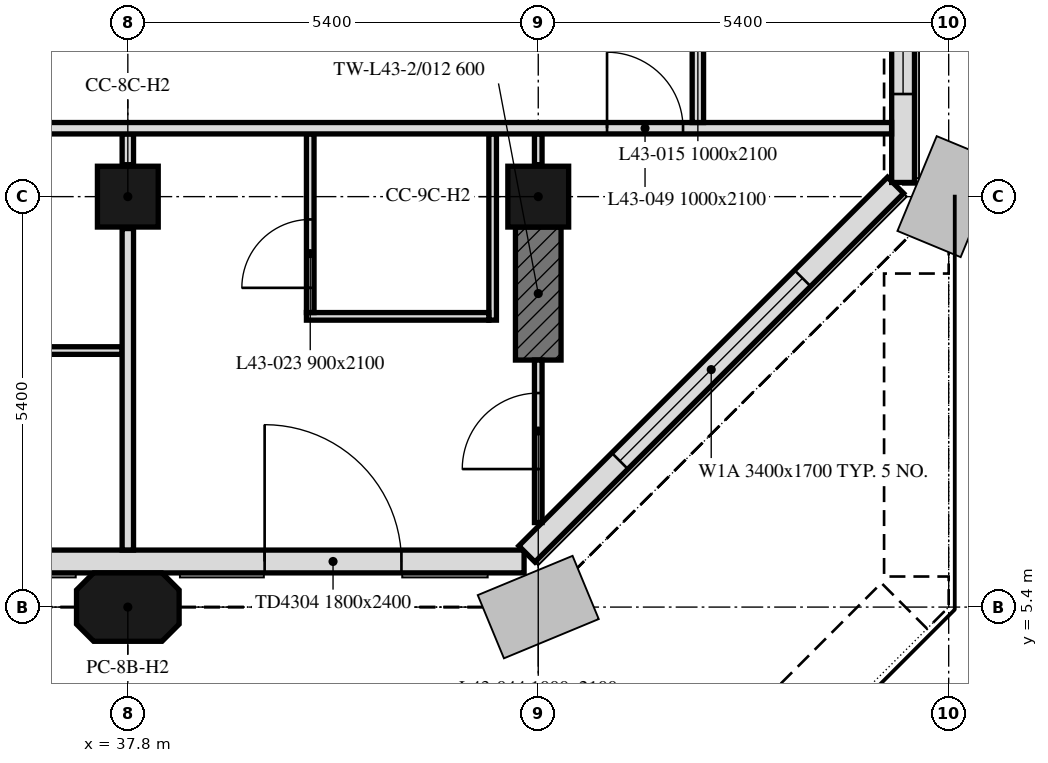
"""IFC4 building model, lengths in metres.
Left out: names, types, materials, properties, quantities, classifications, styles, units other than length and angle.
Written with IfcOpenShell. Run it as: python <this file> out.ifc"""

import sys

from ifc_helpers import new_model, si_unit, direction, frame, frame_2d, origin, origin_2d, place, context, subcontext, project, spatial, polyline, rectangle, outline, extrude, element, fill, save


model = new_model("IFC4")
c1 = context("Model", 3, precision=1e-05, world=origin(), true_north=direction((0.0, 1.0)))
c2 = subcontext(c1, "Body", "Model", "MODEL_VIEW")
j1 = project(units=[si_unit("LENGTHUNIT", "METRE"), si_unit("PLANEANGLEUNIT", "RADIAN")], contexts=[c1])
p1 = place(None, origin())
s1 = spatial("IfcSite", under=j1, at=p1, CompositionType="ELEMENT")
p2 = place(p1, origin())
s2 = spatial("IfcBuilding", under=s1, at=p2, CompositionType="ELEMENT")
p3 = place(p2, frame((0.0, 0.0, 180.7)))
s3 = spatial("IfcBuildingStorey", under=s2, at=p3, CompositionType="ELEMENT", Elevation=180.7)
p4 = place(p3, frame((37.8, 5.4, 0.0), z_axis=(0.0, 0.0, 1.0), x_axis=(1.0, 0.0, 0.0)))
e1 = element("IfcColumn", 1, at=p4, inside=s3, PredefinedType="COLUMN", context=c2, shape_type="SweptSolid", body=[
    extrude(outline(polyline([(-0.45, -0.45), (0.45, -0.45), (0.675, -0.225), (0.675, 0.225), (0.45, 0.45), (-0.45, 0.45), (-0.675, 0.225), (-0.675, -0.225), (-0.45, -0.45)])), origin(), (0.0, 0.0, 1.0), 3.0),
])
for number, where, z_axis, x_axis in (
    (2, (37.8, 10.8, 0.0), (0.0, 0.0, 1.0), (1.0, 0.0, 0.0)),
    (3, (43.2, 10.8, 0.0), (0.0, 0.0, 1.0), (1.0, 0.0, 0.0)),
):
    element("IfcColumn", number, at=place(p3, frame(where, z_axis=z_axis, x_axis=x_axis)), inside=s3, PredefinedType="COLUMN", context=c2, shape_type="SweptSolid", body=[
        extrude(rectangle(XDim=0.8, YDim=0.8, at=origin_2d()), origin(), (0.0, 0.0, 1.0), 3.0),
    ])
p5 = place(p3, frame((43.2, 8.65, 0.0), z_axis=(0.0, 0.0, 1.0), x_axis=(0.0, 1.0, 0.0)))
e4 = element("IfcWall", 4, at=p5, inside=s3, PredefinedType="SHEAR", context=c2, shape_type="SweptSolid", body=[
    extrude(rectangle(XDim=1.75, YDim=0.6, at=frame_2d((0.875, 0.0))), origin(), (0.0, 0.0, 1.0), 3.0),
])
p6 = place(p3, frame((10.986, 6.0, 0.0), z_axis=(0.0, 0.0, 1.0), x_axis=(1.0, 0.0, 0.0)))
e5 = element("IfcWall", 5, at=p6, inside=s3, PredefinedType="SOLIDWALL", context=c2, shape_type="SweptSolid", body=[
    extrude(rectangle(XDim=32.027, YDim=0.3, at=frame_2d((16.014, 0.0))), origin(), (0.0, 0.0, 1.0), 3.0),
])
p7 = place(p6, frame((1.614, 0.0, 0.0)))
e6 = element("IfcOpeningElement", 6, at=p7, cuts=e5, PredefinedType="OPENING", context=c2, shape_type="SweptSolid", body=[
    extrude(rectangle(XDim=1.8, YDim=2.4, at=frame_2d((0.9, 1.2))), frame((0.0, 0.16, 0.0), z_axis=(0.0, -1.0, 0.0), x_axis=(1.0, 0.0, 0.0)), (0.0, 0.0, 1.0), 0.32),
])
p8 = place(p6, frame((12.414, 0.0, 0.0)))
e7 = element("IfcOpeningElement", 7, at=p8, cuts=e5, PredefinedType="OPENING", context=c2, shape_type="SweptSolid", body=[
    extrude(rectangle(XDim=1.8, YDim=2.4, at=frame_2d((0.9, 1.2))), frame((0.0, 0.16, 0.0), z_axis=(0.0, -1.0, 0.0), x_axis=(1.0, 0.0, 0.0)), (0.0, 0.0, 1.0), 0.32),
])
p9 = place(p6, frame((23.214, 0.0, 0.0)))
e8 = element("IfcOpeningElement", 8, at=p9, cuts=e5, PredefinedType="OPENING", context=c2, shape_type="SweptSolid", body=[
    extrude(rectangle(XDim=1.8, YDim=2.4, at=frame_2d((0.9, 1.2))), frame((0.0, 0.16, 0.0), z_axis=(0.0, -1.0, 0.0), x_axis=(1.0, 0.0, 0.0)), (0.0, 0.0, 1.0), 0.32),
])
p10 = place(p6, frame((28.614, 0.0, 0.0)))
e9 = element("IfcOpeningElement", 9, at=p10, cuts=e5, PredefinedType="OPENING", context=c2, shape_type="SweptSolid", body=[
    extrude(rectangle(XDim=1.8, YDim=2.4, at=frame_2d((0.9, 1.2))), frame((0.0, 0.16, 0.0), z_axis=(0.0, -1.0, 0.0), x_axis=(1.0, 0.0, 0.0)), (0.0, 0.0, 1.0), 0.32),
])
p11 = place(p6, frame((7.464, 0.0, 0.9)))
e10 = element("IfcOpeningElement", 10, at=p11, cuts=e5, PredefinedType="OPENING", context=c2, shape_type="SweptSolid", body=[
    extrude(rectangle(XDim=1.1, YDim=1.7, at=frame_2d((0.55, 0.85))), frame((0.0, 0.16, 0.0), z_axis=(0.0, -1.0, 0.0), x_axis=(1.0, 0.0, 0.0)), (0.0, 0.0, 1.0), 0.32),
])
p12 = place(p6, frame((18.264, 0.0, 0.9)))
e11 = element("IfcOpeningElement", 11, at=p12, cuts=e5, PredefinedType="OPENING", context=c2, shape_type="SweptSolid", body=[
    extrude(rectangle(XDim=1.1, YDim=1.7, at=frame_2d((0.55, 0.85))), frame((0.0, 0.16, 0.0), z_axis=(0.0, -1.0, 0.0), x_axis=(1.0, 0.0, 0.0)), (0.0, 0.0, 1.0), 0.32),
])
p13 = place(p3, frame((43.051, 6.099, 0.0), z_axis=(0.0, 0.0, 1.0), x_axis=(0.707106781187, 0.707106781187, 0.0)))
e12 = element("IfcWall", 12, at=p13, inside=s3, PredefinedType="SOLIDWALL", context=c2, shape_type="SweptSolid", body=[
    extrude(rectangle(XDim=6.86, YDim=0.3, at=frame_2d((3.43, 0.0))), origin(), (0.0, 0.0, 1.0), 3.0),
])
p14 = place(p13, frame((1.73, 0.0, 0.9)))
e13 = element("IfcOpeningElement", 13, at=p14, cuts=e12, PredefinedType="OPENING", context=c2, shape_type="SweptSolid", body=[
    extrude(rectangle(XDim=3.4, YDim=1.7, at=frame_2d((1.7, 0.85))), frame((0.0, 0.16, 0.0), z_axis=(0.0, -1.0, 0.0), x_axis=(1.0, 0.0, 0.0)), (0.0, 0.0, 1.0), 0.32),
])
p15 = place(p3, frame((48.0, 10.986, 0.0), z_axis=(0.0, 0.0, 1.0), x_axis=(0.0, 1.0, 0.0)))
e14 = element("IfcWall", 14, at=p15, inside=s3, PredefinedType="SOLIDWALL", context=c2, shape_type="SweptSolid", body=[
    extrude(rectangle(XDim=32.027, YDim=0.3, at=frame_2d((16.014, 0.0))), origin(), (0.0, 0.0, 1.0), 3.0),
])
p16 = place(p15, frame((1.164, 0.0, 0.9)))
e15 = element("IfcOpeningElement", 15, at=p16, cuts=e14, PredefinedType="OPENING", context=c2, shape_type="SweptSolid", body=[
    extrude(rectangle(XDim=1.1, YDim=1.7, at=frame_2d((0.55, 0.85))), frame((0.0, 0.16, 0.0), z_axis=(0.0, -1.0, 0.0), x_axis=(1.0, 0.0, 0.0)), (0.0, 0.0, 1.0), 0.32),
])
p17 = place(p15, frame((2.764, 0.0, 0.9)))
e16 = element("IfcOpeningElement", 16, at=p17, cuts=e14, PredefinedType="OPENING", context=c2, shape_type="SweptSolid", body=[
    extrude(rectangle(XDim=1.1, YDim=1.7, at=frame_2d((0.55, 0.85))), frame((0.0, 0.16, 0.0), z_axis=(0.0, -1.0, 0.0), x_axis=(1.0, 0.0, 0.0)), (0.0, 0.0, 1.0), 0.32),
])
p18 = place(p15, frame((7.664, 0.0, 0.9)))
e17 = element("IfcOpeningElement", 17, at=p18, cuts=e14, PredefinedType="OPENING", context=c2, shape_type="SweptSolid", body=[
    extrude(rectangle(XDim=0.5, YDim=1.7, at=frame_2d((0.25, 0.85))), frame((0.0, 0.16, 0.0), z_axis=(0.0, -1.0, 0.0), x_axis=(1.0, 0.0, 0.0)), (0.0, 0.0, 1.0), 0.32),
])
p19 = place(p15, frame((13.064, 0.0, 0.9)))
e18 = element("IfcOpeningElement", 18, at=p19, cuts=e14, PredefinedType="OPENING", context=c2, shape_type="SweptSolid", body=[
    extrude(rectangle(XDim=0.5, YDim=1.7, at=frame_2d((0.25, 0.85))), frame((0.0, 0.16, 0.0), z_axis=(0.0, -1.0, 0.0), x_axis=(1.0, 0.0, 0.0)), (0.0, 0.0, 1.0), 0.32),
])
p20 = place(p15, frame((18.464, 0.0, 0.9)))
e19 = element("IfcOpeningElement", 19, at=p20, cuts=e14, PredefinedType="OPENING", context=c2, shape_type="SweptSolid", body=[
    extrude(rectangle(XDim=0.5, YDim=1.7, at=frame_2d((0.25, 0.85))), frame((0.0, 0.16, 0.0), z_axis=(0.0, -1.0, 0.0), x_axis=(1.0, 0.0, 0.0)), (0.0, 0.0, 1.0), 0.32),
])
p21 = place(p15, frame((23.864, 0.0, 0.9)))
e20 = element("IfcOpeningElement", 20, at=p21, cuts=e14, PredefinedType="OPENING", context=c2, shape_type="SweptSolid", body=[
    extrude(rectangle(XDim=0.5, YDim=1.7, at=frame_2d((0.25, 0.85))), frame((0.0, 0.16, 0.0), z_axis=(0.0, -1.0, 0.0), x_axis=(1.0, 0.0, 0.0)), (0.0, 0.0, 1.0), 0.32),
])
p22 = place(p15, frame((28.164, 0.0, 0.9)))
e21 = element("IfcOpeningElement", 21, at=p22, cuts=e14, PredefinedType="OPENING", context=c2, shape_type="SweptSolid", body=[
    extrude(rectangle(XDim=1.1, YDim=1.7, at=frame_2d((0.55, 0.85))), frame((0.0, 0.16, 0.0), z_axis=(0.0, -1.0, 0.0), x_axis=(1.0, 0.0, 0.0)), (0.0, 0.0, 1.0), 0.32),
])
p23 = place(p15, frame((29.764, 0.0, 0.9)))
e22 = element("IfcOpeningElement", 22, at=p23, cuts=e14, PredefinedType="OPENING", context=c2, shape_type="SweptSolid", body=[
    extrude(rectangle(XDim=1.1, YDim=1.7, at=frame_2d((0.55, 0.85))), frame((0.0, 0.16, 0.0), z_axis=(0.0, -1.0, 0.0), x_axis=(1.0, 0.0, 0.0)), (0.0, 0.0, 1.0), 0.32),
])
p24 = place(p3, frame((37.725, 8.775, 0.0), z_axis=(0.0, 0.0, 1.0), x_axis=(-1.0, 0.0, 0.0)))
e23 = element("IfcWall", 23, at=p24, inside=s3, PredefinedType="PARTITIONING", context=c2, shape_type="SweptSolid", body=[
    extrude(rectangle(XDim=2.375, YDim=0.1, at=frame_2d((1.188, 0.0))), origin(), (0.0, 0.0, 1.0), 3.0),
])
p25 = place(p3, frame((37.8, 6.151, 0.0), z_axis=(0.0, 0.0, 1.0), x_axis=(0.0, 1.0, 0.0)))
e24 = element("IfcWall", 24, at=p25, inside=s3, PredefinedType="PARTITIONING", context=c2, shape_type="SweptSolid", body=[
    extrude(rectangle(XDim=4.229, YDim=0.15, at=frame_2d((2.115, 0.0))), origin(), (0.0, 0.0, 1.0), 3.0),
])
p26 = place(p3, frame((37.8, 11.22, 0.0), z_axis=(0.0, 0.0, 1.0), x_axis=(0.0, 1.0, 0.0)))
e25 = element("IfcWall", 25, at=p26, inside=s3, PredefinedType="PARTITIONING", context=c2, shape_type="SweptSolid", body=[
    extrude(rectangle(XDim=0.405, YDim=0.15, at=frame_2d((0.203, 0.0))), origin(), (0.0, 0.0, 1.0), 3.0),
])
p27 = place(p3, frame((43.2, 6.512, 0.0), z_axis=(0.0, 0.0, 1.0), x_axis=(0.0, 1.0, 0.0)))
e26 = element("IfcWall", 26, at=p27, inside=s3, PredefinedType="PARTITIONING", context=c2, shape_type="SweptSolid", body=[
    extrude(rectangle(XDim=2.138, YDim=0.1, at=frame_2d((1.069, 0.0))), origin(), (0.0, 0.0, 1.0), 3.0),
])
p28 = place(p27, frame((0.704, 0.0, 0.0)))
e27 = element("IfcOpeningElement", 27, at=p28, cuts=e26, PredefinedType="OPENING", context=c2, shape_type="SweptSolid", body=[
    extrude(rectangle(XDim=1.0, YDim=2.1, at=frame_2d((0.5, 1.05))), frame((0.0, 0.05, 0.0), z_axis=(0.0, -1.0, 0.0), x_axis=(1.0, 0.0, 0.0)), (0.0, 0.0, 1.0), 0.1),
])
p29 = place(p3, frame((43.2, 11.22, 0.0), z_axis=(0.0, 0.0, 1.0), x_axis=(0.0, 1.0, 0.0)))
e28 = element("IfcWall", 28, at=p29, inside=s3, PredefinedType="PARTITIONING", context=c2, shape_type="SweptSolid", body=[
    extrude(rectangle(XDim=0.405, YDim=0.1, at=frame_2d((0.203, 0.0))), origin(), (0.0, 0.0, 1.0), 3.0),
])
p30 = place(p3, frame((42.6, 11.625, 0.0), z_axis=(0.0, 0.0, 1.0), x_axis=(0.0, -1.0, 0.0)))
e29 = element("IfcWall", 29, at=p30, inside=s3, PredefinedType="PARTITIONING", context=c2, shape_type="SweptSolid", body=[
    extrude(rectangle(XDim=2.45, YDim=0.1, at=frame_2d((1.225, 0.0))), origin(), (0.0, 0.0, 1.0), 3.0),
])
p31 = place(p3, frame((42.55, 9.225, 0.0), z_axis=(0.0, 0.0, 1.0), x_axis=(-1.0, 0.0, 0.0)))
e30 = element("IfcWall", 30, at=p31, inside=s3, PredefinedType="PARTITIONING", context=c2, shape_type="SweptSolid", body=[
    extrude(rectangle(XDim=2.4, YDim=0.1, at=frame_2d((1.2, 0.0))), origin(), (0.0, 0.0, 1.0), 3.0),
])
p32 = place(p3, frame((40.2, 9.275, 0.0), z_axis=(0.0, 0.0, 1.0), x_axis=(0.0, 1.0, 0.0)))
e31 = element("IfcWall", 31, at=p32, inside=s3, PredefinedType="PARTITIONING", context=c2, shape_type="SweptSolid", body=[
    extrude(rectangle(XDim=2.35, YDim=0.1, at=frame_2d((1.175, 0.0))), origin(), (0.0, 0.0, 1.0), 3.0),
])
p33 = place(p32, frame((0.325, 0.0, 0.0)))
e32 = element("IfcOpeningElement", 32, at=p33, cuts=e31, PredefinedType="OPENING", context=c2, shape_type="SweptSolid", body=[
    extrude(rectangle(XDim=0.9, YDim=2.1, at=frame_2d((0.45, 1.05))), frame((0.0, 0.05, 0.0), z_axis=(0.0, -1.0, 0.0), x_axis=(1.0, 0.0, 0.0)), (0.0, 0.0, 1.0), 0.1),
])
p34 = place(p3, frame((6.151, 11.7, 0.0), z_axis=(0.0, 0.0, 1.0), x_axis=(1.0, 0.0, 0.0)))
e33 = element("IfcWall", 33, at=p34, inside=s3, PredefinedType="PARTITIONING", context=c2, shape_type="SweptSolid", body=[
    extrude(rectangle(XDim=41.698, YDim=0.15, at=frame_2d((20.849, 0.0))), origin(), (0.0, 0.0, 1.0), 3.0),
])
p35 = place(p34, frame((1.449, 0.0, 0.0)))
e34 = element("IfcOpeningElement", 34, at=p35, cuts=e33, PredefinedType="OPENING", context=c2, shape_type="SweptSolid", body=[
    extrude(rectangle(XDim=1.0, YDim=2.1, at=frame_2d((0.5, 1.05))), frame((0.0, 0.075, 0.0), z_axis=(0.0, -1.0, 0.0), x_axis=(1.0, 0.0, 0.0)), (0.0, 0.0, 1.0), 0.15),
])
p36 = place(p34, frame((37.954, 0.0, 0.0)))
e35 = element("IfcOpeningElement", 35, at=p36, cuts=e33, PredefinedType="OPENING", context=c2, shape_type="SweptSolid", body=[
    extrude(rectangle(XDim=1.0, YDim=2.1, at=frame_2d((0.5, 1.05))), frame((0.0, 0.075, 0.0), z_axis=(0.0, -1.0, 0.0), x_axis=(1.0, 0.0, 0.0)), (0.0, 0.0, 1.0), 0.15),
])
p37 = place(p34, frame((12.449, 0.0, 0.0)))
e36 = element("IfcOpeningElement", 36, at=p37, cuts=e33, PredefinedType="OPENING", context=c2, shape_type="SweptSolid", body=[
    extrude(rectangle(XDim=1.0, YDim=2.1, at=frame_2d((0.5, 1.05))), frame((0.0, 0.075, 0.0), z_axis=(0.0, -1.0, 0.0), x_axis=(1.0, 0.0, 0.0)), (0.0, 0.0, 1.0), 0.15),
])
p38 = place(p34, frame((23.249, 0.0, 0.0)))
e37 = element("IfcOpeningElement", 37, at=p38, cuts=e33, PredefinedType="OPENING", context=c2, shape_type="SweptSolid", body=[
    extrude(rectangle(XDim=1.0, YDim=2.1, at=frame_2d((0.5, 1.05))), frame((0.0, 0.075, 0.0), z_axis=(0.0, -1.0, 0.0), x_axis=(1.0, 0.0, 0.0)), (0.0, 0.0, 1.0), 0.15),
])
p39 = place(p3, frame((45.3, 26.925, 0.0), z_axis=(0.0, 0.0, 1.0), x_axis=(0.0, -1.0, 0.0)))
e38 = element("IfcWall", 38, at=p39, inside=s3, PredefinedType="PARTITIONING", context=c2, shape_type="SweptSolid", body=[
    extrude(rectangle(XDim=15.15, YDim=0.15, at=frame_2d((7.575, 0.0))), origin(), (0.0, 0.0, 1.0), 2.4),
])
p40 = place(p39, frame((12.475, 0.0, 0.0)))
e39 = element("IfcOpeningElement", 39, at=p40, cuts=e38, PredefinedType="OPENING", context=c2, shape_type="SweptSolid", body=[
    extrude(rectangle(XDim=1.0, YDim=2.1, at=frame_2d((0.5, 1.05))), frame((0.0, 0.075, 0.0), z_axis=(0.0, -1.0, 0.0), x_axis=(1.0, 0.0, 0.0)), (0.0, 0.0, 1.0), 0.15),
])
p41 = place(p39, frame((6.175, 0.0, 0.0)))
e40 = element("IfcOpeningElement", 40, at=p41, cuts=e38, PredefinedType="OPENING", context=c2, shape_type="SweptSolid", body=[
    extrude(rectangle(XDim=1.0, YDim=2.1, at=frame_2d((0.5, 1.05))), frame((0.0, 0.075, 0.0), z_axis=(0.0, -1.0, 0.0), x_axis=(1.0, 0.0, 0.0)), (0.0, 0.0, 1.0), 0.15),
])
p42 = place(p10, origin())
e41 = element("IfcDoor", 41, at=p42, inside=s3, OperationType="DOUBLE_DOOR_DOUBLE_SWING", PredefinedType="DOOR", context=c2, shape_type="SweptSolid", body=[
    extrude(rectangle(XDim=1.8, YDim=2.4, at=frame_2d((0.9, 1.2))), frame((0.0, 0.025, 0.0), z_axis=(0.0, -1.0, 0.0), x_axis=(1.0, 0.0, 0.0)), (0.0, 0.0, 1.0), 0.05),
])
fill(e9, e41)
p43 = place(p14, origin())
e42 = element("IfcWindow", 42, at=p43, inside=s3, PartitioningType="SINGLE_PANEL", PredefinedType="WINDOW", context=c2, shape_type="SweptSolid", body=[
    extrude(rectangle(XDim=3.4, YDim=1.7, at=frame_2d((1.7, 0.85))), frame((0.0, 0.03, 0.0), z_axis=(0.0, -1.0, 0.0), x_axis=(1.0, 0.0, 0.0)), (0.0, 0.0, 1.0), 0.06),
])
fill(e13, e42)
p44 = place(p16, origin())
e43 = element("IfcWindow", 43, at=p44, inside=s3, PartitioningType="SINGLE_PANEL", PredefinedType="WINDOW", context=c2, shape_type="SweptSolid", body=[
    extrude(rectangle(XDim=1.1, YDim=1.7, at=frame_2d((0.55, 0.85))), frame((0.0, 0.03, 0.0), z_axis=(0.0, -1.0, 0.0), x_axis=(1.0, 0.0, 0.0)), (0.0, 0.0, 1.0), 0.06),
])
fill(e15, e43)
p45 = place(p33, origin())
e44 = element("IfcDoor", 44, at=p45, inside=s3, OperationType="SINGLE_SWING_RIGHT", PredefinedType="DOOR", context=c2, shape_type="SweptSolid", body=[
    extrude(rectangle(XDim=0.9, YDim=2.1, at=frame_2d((0.45, 1.05))), frame((0.0, 0.025, 0.0), z_axis=(0.0, -1.0, 0.0), x_axis=(1.0, 0.0, 0.0)), (0.0, 0.0, 1.0), 0.05),
])
fill(e32, e44)
p46 = place(p28, origin())
e45 = element("IfcDoor", 45, at=p46, inside=s3, OperationType="SINGLE_SWING_RIGHT", PredefinedType="DOOR", context=c2, shape_type="SweptSolid", body=[
    extrude(rectangle(XDim=1.0, YDim=2.1, at=frame_2d((0.5, 1.05))), frame((0.0, 0.025, 0.0), z_axis=(0.0, -1.0, 0.0), x_axis=(1.0, 0.0, 0.0)), (0.0, 0.0, 1.0), 0.05),
])
fill(e27, e45)
p47 = place(p36, origin())
e46 = element("IfcDoor", 46, at=p47, inside=s3, OperationType="SINGLE_SWING_RIGHT", PredefinedType="DOOR", context=c2, shape_type="SweptSolid", body=[
    extrude(rectangle(XDim=1.0, YDim=2.1, at=frame_2d((0.5, 1.05))), frame((0.0, 0.025, 0.0), z_axis=(0.0, -1.0, 0.0), x_axis=(1.0, 0.0, 0.0)), (0.0, 0.0, 1.0), 0.05),
])
fill(e35, e46)
save(model, sys.argv[1])
